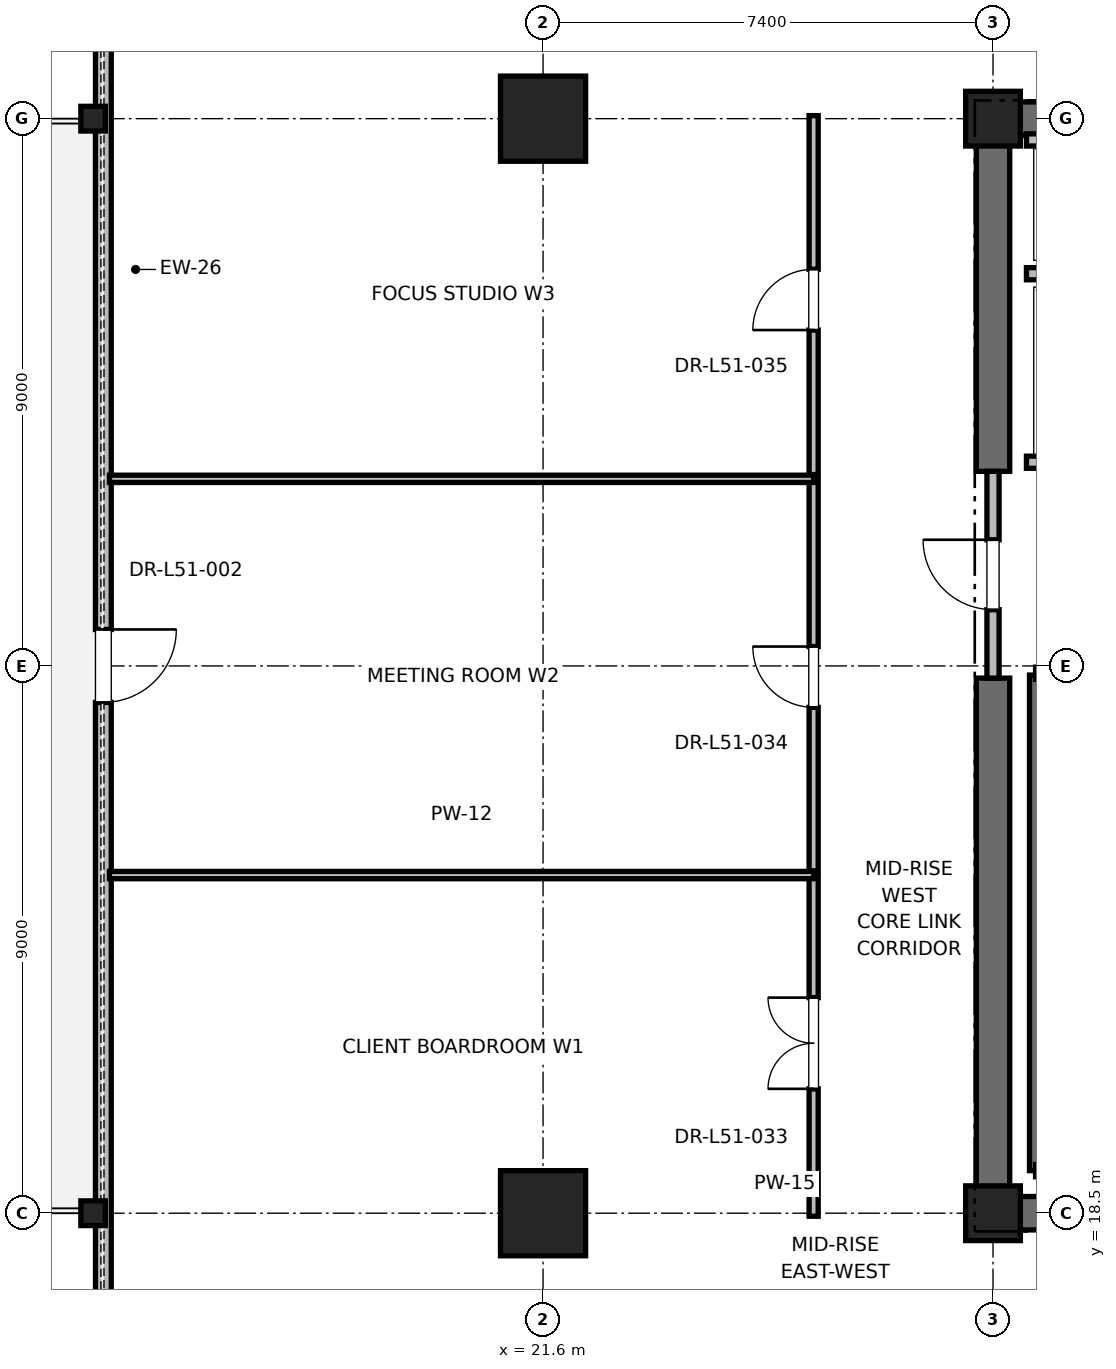
"""IFC4 building model, lengths in metres.
Left out: names, types, materials, properties, quantities, classifications, styles, units other than length and angle.
Written with IfcOpenShell. Run it as: python <this file> out.ifc"""

import sys

from ifc_helpers import new_model, si_unit, direction, frame, frame_2d, origin, origin_2d, place, context, subcontext, project, spatial, rectangle, i_section, extrude, element, fill, save


model = new_model("IFC4")
c1 = context("Model", 3, precision=1e-05, world=origin(), true_north=direction((0.0, 1.0)))
c2 = subcontext(c1, "Body", "Model", "MODEL_VIEW")
j1 = project(units=[si_unit("LENGTHUNIT", "METRE"), si_unit("PLANEANGLEUNIT", "RADIAN")], contexts=[c1])
p1 = place(None, origin())
s1 = spatial("IfcSite", under=j1, at=p1, CompositionType="ELEMENT")
p2 = place(p1, origin())
s2 = spatial("IfcBuilding", under=s1, at=p2, CompositionType="ELEMENT")
p3 = place(p2, frame((0.0, 0.0, 221.2)))
s3 = spatial("IfcBuildingStorey", under=s2, at=p3, CompositionType="ELEMENT", Elevation=221.2)
for number, where, z_axis, x_axis in (
    (1, (21.6, 18.5, 0.0), (0.0, 0.0, 1.0), (1.0, 0.0, 0.0)),
    (2, (21.6, 36.5, 0.0), (0.0, 0.0, 1.0), (1.0, 0.0, 0.0)),
):
    element("IfcColumn", number, at=place(p3, frame(where, z_axis=z_axis, x_axis=x_axis)), inside=s3, PredefinedType="COLUMN", context=c2, shape_type="SweptSolid", body=[
        extrude(rectangle(XDim=1.4, YDim=1.4, at=origin_2d()), origin(), (0.0, 0.0, 1.0), 4.0),
    ])
for number, where, z_axis, x_axis in (
    (3, (14.2, 18.5, 0.0), (0.0, 0.0, 1.0), (1.0, 0.0, 0.0)),
    (4, (14.2, 36.5, 0.0), (0.0, 0.0, 1.0), (1.0, 0.0, 0.0)),
):
    element("IfcColumn", number, at=place(p3, frame(where, z_axis=z_axis, x_axis=x_axis)), inside=s3, PredefinedType="COLUMN", context=c2, shape_type="SweptSolid", body=[
        extrude(i_section(OverallWidth=0.403, OverallDepth=0.406, WebThickness=0.027, FlangeThickness=0.043, FilletRadius=0.015, at=origin_2d()), origin(), (0.0, 0.0, 1.0), 4.0),
    ])
for number, where, z_axis, x_axis in (
    (5, (29.0, 18.5, 0.0), (0.0, 0.0, 1.0), (1.0, 0.0, 0.0)),
    (6, (29.0, 36.5, 0.0), (0.0, 0.0, 1.0), (1.0, 0.0, 0.0)),
):
    element("IfcColumn", number, at=place(p3, frame(where, z_axis=z_axis, x_axis=x_axis)), inside=s3, PredefinedType="PILASTER", context=c2, shape_type="SweptSolid", body=[
        extrude(rectangle(XDim=0.9, YDim=0.9, at=origin_2d()), origin(), (0.0, 0.0, 1.0), 4.0),
    ])
p4 = place(p3, frame((29.0, 18.5, 0.0), z_axis=(0.0, 0.0, 1.0), x_axis=(1.0, 0.0, 0.0)))
e7 = element("IfcWall", 7, at=p4, inside=s3, PredefinedType="SHEAR", context=c2, shape_type="SweptSolid", body=[
    extrude(rectangle(XDim=9.2, YDim=0.55, at=frame_2d((4.6, 0.0))), origin(), (0.0, 0.0, 1.0), 3.775),
])
p5 = place(p3, frame((29.0, 36.5, 0.0), z_axis=(0.0, 0.0, 1.0), x_axis=(1.0, 0.0, 0.0)))
e8 = element("IfcWall", 8, at=p5, inside=s3, PredefinedType="SHEAR", context=c2, shape_type="SweptSolid", body=[
    extrude(rectangle(XDim=5.8, YDim=0.55, at=frame_2d((2.9, 0.0))), origin(), (0.0, 0.0, 1.0), 3.775),
])
p6 = place(p3, frame((29.0, 18.5, 0.0), z_axis=(0.0, 0.0, 1.0), x_axis=(0.0, 1.0, 0.0)))
e9 = element("IfcWall", 9, at=p6, inside=s3, PredefinedType="SHEAR", context=c2, shape_type="SweptSolid", body=[
    extrude(rectangle(XDim=8.8, YDim=0.55, at=frame_2d((4.4, 0.0))), origin(), (0.0, 0.0, 1.0), 3.775),
])
p7 = place(p3, frame((29.0, 30.7, 0.0), z_axis=(0.0, 0.0, 1.0), x_axis=(0.0, 1.0, 0.0)))
e10 = element("IfcWall", 10, at=p7, inside=s3, PredefinedType="SHEAR", context=c2, shape_type="SweptSolid", body=[
    extrude(rectangle(XDim=5.8, YDim=0.55, at=frame_2d((2.9, 0.0))), origin(), (0.0, 0.0, 1.0), 3.775),
])
p8 = place(p3, frame((14.369, 46.14, 0.0), z_axis=(0.0, 0.0, 1.0), x_axis=(0.0, -1.0, 0.0)))
e11 = element("IfcWall", 11, at=p8, inside=s3, PredefinedType="PARAPET", context=c2, shape_type="SweptSolid", body=[
    extrude(rectangle(XDim=37.281, YDim=0.26, at=frame_2d((18.64, 0.0))), origin(), (0.0, 0.0, 1.0), 3.047),
])
p9 = place(p8, frame((4.2, 0.0, 0.85)))
e12 = element("IfcOpeningElement", 12, at=p9, cuts=e11, PredefinedType="OPENING", context=c2, shape_type="SweptSolid", body=[
    extrude(rectangle(XDim=2.0, YDim=2.3, at=frame_2d((1.0, 1.15))), frame((0.0, 0.13, 0.0), z_axis=(0.0, -1.0, 0.0), x_axis=(1.0, 0.0, 0.0)), (0.0, 0.0, 1.0), 0.26),
])
p10 = place(p8, frame((18.04, 0.0, 0.0)))
e13 = element("IfcOpeningElement", 13, at=p10, cuts=e11, PredefinedType="OPENING", context=c2, shape_type="SweptSolid", body=[
    extrude(rectangle(XDim=1.2, YDim=2.2, at=frame_2d((0.6, 1.1))), frame((0.0, 0.13, 0.0), z_axis=(0.0, -1.0, 0.0), x_axis=(1.0, 0.0, 0.0)), (0.0, 0.0, 1.0), 0.26),
])
p11 = place(p8, frame((31.081, 0.0, 0.85)))
e14 = element("IfcOpeningElement", 14, at=p11, cuts=e11, PredefinedType="OPENING", context=c2, shape_type="SweptSolid", body=[
    extrude(rectangle(XDim=2.0, YDim=2.3, at=frame_2d((1.0, 1.15))), frame((0.0, 0.13, 0.0), z_axis=(0.0, -1.0, 0.0), x_axis=(1.0, 0.0, 0.0)), (0.0, 0.0, 1.0), 0.26),
])
p12 = place(p3, frame((29.7, 19.2, 0.0), z_axis=(0.0, 0.0, 1.0), x_axis=(0.0, 1.0, 0.0)))
e15 = element("IfcWall", 15, at=p12, inside=s3, PredefinedType="SOLIDWALL", context=c2, shape_type="SweptSolid", body=[
    extrude(rectangle(XDim=8.15, YDim=0.2, at=frame_2d((4.075, 0.0))), origin(), (0.0, 0.0, 1.0), 3.775),
])
p13 = place(p3, frame((29.0, 27.3, 0.0), z_axis=(0.0, 0.0, 1.0), x_axis=(0.0, 1.0, 0.0)))
e16 = element("IfcWall", 16, at=p13, inside=s3, PredefinedType="PARTITIONING", context=c2, shape_type="SweptSolid", body=[
    extrude(rectangle(XDim=3.4, YDim=0.2, at=frame_2d((1.7, 0.0))), origin(), (0.0, 0.0, 1.0), 2.755),
])
p14 = place(p13, frame((1.125, 0.0, 0.0)))
e17 = element("IfcOpeningElement", 17, at=p14, cuts=e16, PredefinedType="OPENING", context=c2, shape_type="SweptSolid", body=[
    extrude(rectangle(XDim=1.15, YDim=2.2, at=frame_2d((0.575, 1.1))), frame((0.0, 0.1, 0.0), z_axis=(0.0, -1.0, 0.0), x_axis=(1.0, 0.0, 0.0)), (0.0, 0.0, 1.0), 0.2),
])
p15 = place(p3, frame((29.55, 30.85, 0.0), z_axis=(0.0, 0.0, 1.0), x_axis=(1.0, 0.0, 0.0)))
e18 = element("IfcWall", 18, at=p15, inside=s3, PredefinedType="SOLIDWALL", context=c2, shape_type="SweptSolid", body=[
    extrude(rectangle(XDim=2.6, YDim=0.2, at=frame_2d((1.3, 0.0))), origin(), (0.0, 0.0, 1.0), 2.755),
])
p16 = place(p15, frame((0.75, 0.0, 0.0)))
e19 = element("IfcOpeningElement", 19, at=p16, cuts=e18, PredefinedType="OPENING", context=c2, shape_type="SweptSolid", body=[
    extrude(rectangle(XDim=1.1, YDim=2.2, at=frame_2d((0.55, 1.1))), frame((0.0, 0.1, 0.0), z_axis=(0.0, -1.0, 0.0), x_axis=(1.0, 0.0, 0.0)), (0.0, 0.0, 1.0), 0.2),
])
p17 = place(p3, frame((29.55, 33.95, 0.0), z_axis=(0.0, 0.0, 1.0), x_axis=(1.0, 0.0, 0.0)))
e20 = element("IfcWall", 20, at=p17, inside=s3, PredefinedType="SOLIDWALL", context=c2, shape_type="SweptSolid", body=[
    extrude(rectangle(XDim=2.8, YDim=0.2, at=frame_2d((1.4, 0.0))), origin(), (0.0, 0.0, 1.0), 3.775),
])
p18 = place(p3, frame((32.35, 36.15, 0.0), z_axis=(0.0, 0.0, 1.0), x_axis=(-1.0, 0.0, 0.0)))
e21 = element("IfcWall", 21, at=p18, inside=s3, PredefinedType="SOLIDWALL", context=c2, shape_type="SweptSolid", body=[
    extrude(rectangle(XDim=2.8, YDim=0.2, at=frame_2d((1.4, 0.0))), origin(), (0.0, 0.0, 1.0), 3.062),
])
p19 = place(p3, frame((26.05, 18.45, 0.0), z_axis=(0.0, 0.0, 1.0), x_axis=(0.0, 1.0, 0.0)))
e22 = element("IfcWall", 22, at=p19, inside=s3, PredefinedType="PARTITIONING", context=c2, shape_type="SweptSolid", body=[
    extrude(rectangle(XDim=5.611, YDim=0.15, at=frame_2d((2.806, 0.0))), origin(), (0.0, 0.0, 1.0), 2.85),
])
p20 = place(p19, frame((2.095, 0.0, 0.0)))
e23 = element("IfcOpeningElement", 23, at=p20, cuts=e22, PredefinedType="OPENING", context=c2, shape_type="SweptSolid", body=[
    extrude(rectangle(XDim=1.5, YDim=2.25, at=frame_2d((0.75, 1.125))), frame((0.0, 0.075, 0.0), z_axis=(0.0, -1.0, 0.0), x_axis=(1.0, 0.0, 0.0)), (0.0, 0.0, 1.0), 0.15),
])
p21 = place(p3, frame((14.469, 24.061, 0.0), z_axis=(0.0, 0.0, 1.0), x_axis=(1.0, 0.0, 0.0)))
e24 = element("IfcWall", 24, at=p21, inside=s3, PredefinedType="PARTITIONING", context=c2, shape_type="SweptSolid", body=[
    extrude(rectangle(XDim=11.581, YDim=0.12, at=frame_2d((5.791, 0.0))), origin(), (0.0, 0.0, 1.0), 2.85),
])
p22 = place(p3, frame((26.05, 24.131, 0.0), z_axis=(0.0, 0.0, 1.0), x_axis=(0.0, 1.0, 0.0)))
e25 = element("IfcWall", 25, at=p22, inside=s3, PredefinedType="PARTITIONING", context=c2, shape_type="SweptSolid", body=[
    extrude(rectangle(XDim=6.446, YDim=0.15, at=frame_2d((3.223, 0.0))), origin(), (0.0, 0.0, 1.0), 2.85),
])
p23 = place(p22, frame((2.688, 0.0, 0.0)))
e26 = element("IfcOpeningElement", 26, at=p23, cuts=e25, PredefinedType="OPENING", context=c2, shape_type="SweptSolid", body=[
    extrude(rectangle(XDim=1.0, YDim=2.15, at=frame_2d((0.5, 1.075))), frame((0.0, 0.075, 0.0), z_axis=(0.0, -1.0, 0.0), x_axis=(1.0, 0.0, 0.0)), (0.0, 0.0, 1.0), 0.15),
])
p24 = place(p3, frame((14.469, 30.577, 0.0), z_axis=(0.0, 0.0, 1.0), x_axis=(1.0, 0.0, 0.0)))
e27 = element("IfcWall", 27, at=p24, inside=s3, PredefinedType="PARTITIONING", context=c2, shape_type="SweptSolid", body=[
    extrude(rectangle(XDim=11.581, YDim=0.12, at=frame_2d((5.791, 0.0))), origin(), (0.0, 0.0, 1.0), 2.85),
])
p25 = place(p3, frame((26.05, 30.647, 0.0), z_axis=(0.0, 0.0, 1.0), x_axis=(0.0, 1.0, 0.0)))
e28 = element("IfcWall", 28, at=p25, inside=s3, PredefinedType="PARTITIONING", context=c2, shape_type="SweptSolid", body=[
    extrude(rectangle(XDim=5.903, YDim=0.15, at=frame_2d((2.952, 0.0))), origin(), (0.0, 0.0, 1.0), 2.85),
])
p26 = place(p25, frame((2.376, 0.0, 0.0)))
e29 = element("IfcOpeningElement", 29, at=p26, cuts=e28, PredefinedType="OPENING", context=c2, shape_type="SweptSolid", body=[
    extrude(rectangle(XDim=1.0, YDim=2.15, at=frame_2d((0.5, 1.075))), frame((0.0, 0.075, 0.0), z_axis=(0.0, -1.0, 0.0), x_axis=(1.0, 0.0, 0.0)), (0.0, 0.0, 1.0), 0.15),
])
p27 = place(p10, origin())
e30 = element("IfcDoor", 30, at=p27, inside=s3, OperationType="SINGLE_SWING_LEFT", PredefinedType="DOOR", context=c2, shape_type="SweptSolid", body=[
    extrude(rectangle(XDim=1.2, YDim=2.2, at=frame_2d((0.6, 1.1))), frame((0.0, 0.025, 0.0), z_axis=(0.0, -1.0, 0.0), x_axis=(1.0, 0.0, 0.0)), (0.0, 0.0, 1.0), 0.05),
])
fill(e13, e30)
p28 = place(p14, origin())
e31 = element("IfcDoor", 31, at=p28, inside=s3, OperationType="SINGLE_SWING_RIGHT", PredefinedType="DOOR", context=c2, shape_type="SweptSolid", body=[
    extrude(rectangle(XDim=1.15, YDim=2.2, at=frame_2d((0.575, 1.1))), frame((0.0, 0.025, 0.0), z_axis=(0.0, -1.0, 0.0), x_axis=(1.0, 0.0, 0.0)), (0.0, 0.0, 1.0), 0.05),
])
fill(e17, e31)
p29 = place(p20, origin())
e32 = element("IfcDoor", 32, at=p29, inside=s3, OperationType="DOUBLE_DOOR_SINGLE_SWING", PredefinedType="DOOR", context=c2, shape_type="SweptSolid", body=[
    extrude(rectangle(XDim=1.5, YDim=2.25, at=frame_2d((0.75, 1.125))), frame((0.0, 0.025, 0.0), z_axis=(0.0, -1.0, 0.0), x_axis=(1.0, 0.0, 0.0)), (0.0, 0.0, 1.0), 0.05),
])
fill(e23, e32)
p30 = place(p23, origin())
e33 = element("IfcDoor", 33, at=p30, inside=s3, OperationType="SINGLE_SWING_RIGHT", PredefinedType="DOOR", context=c2, shape_type="SweptSolid", body=[
    extrude(rectangle(XDim=1.0, YDim=2.15, at=frame_2d((0.5, 1.075))), frame((0.0, 0.025, 0.0), z_axis=(0.0, -1.0, 0.0), x_axis=(1.0, 0.0, 0.0)), (0.0, 0.0, 1.0), 0.05),
])
fill(e26, e33)
p31 = place(p26, origin())
e34 = element("IfcDoor", 34, at=p31, inside=s3, OperationType="SINGLE_SWING_LEFT", PredefinedType="DOOR", context=c2, shape_type="SweptSolid", body=[
    extrude(rectangle(XDim=1.0, YDim=2.15, at=frame_2d((0.5, 1.075))), frame((0.0, 0.025, 0.0), z_axis=(0.0, -1.0, 0.0), x_axis=(1.0, 0.0, 0.0)), (0.0, 0.0, 1.0), 0.05),
])
fill(e29, e34)
save(model, sys.argv[1])
